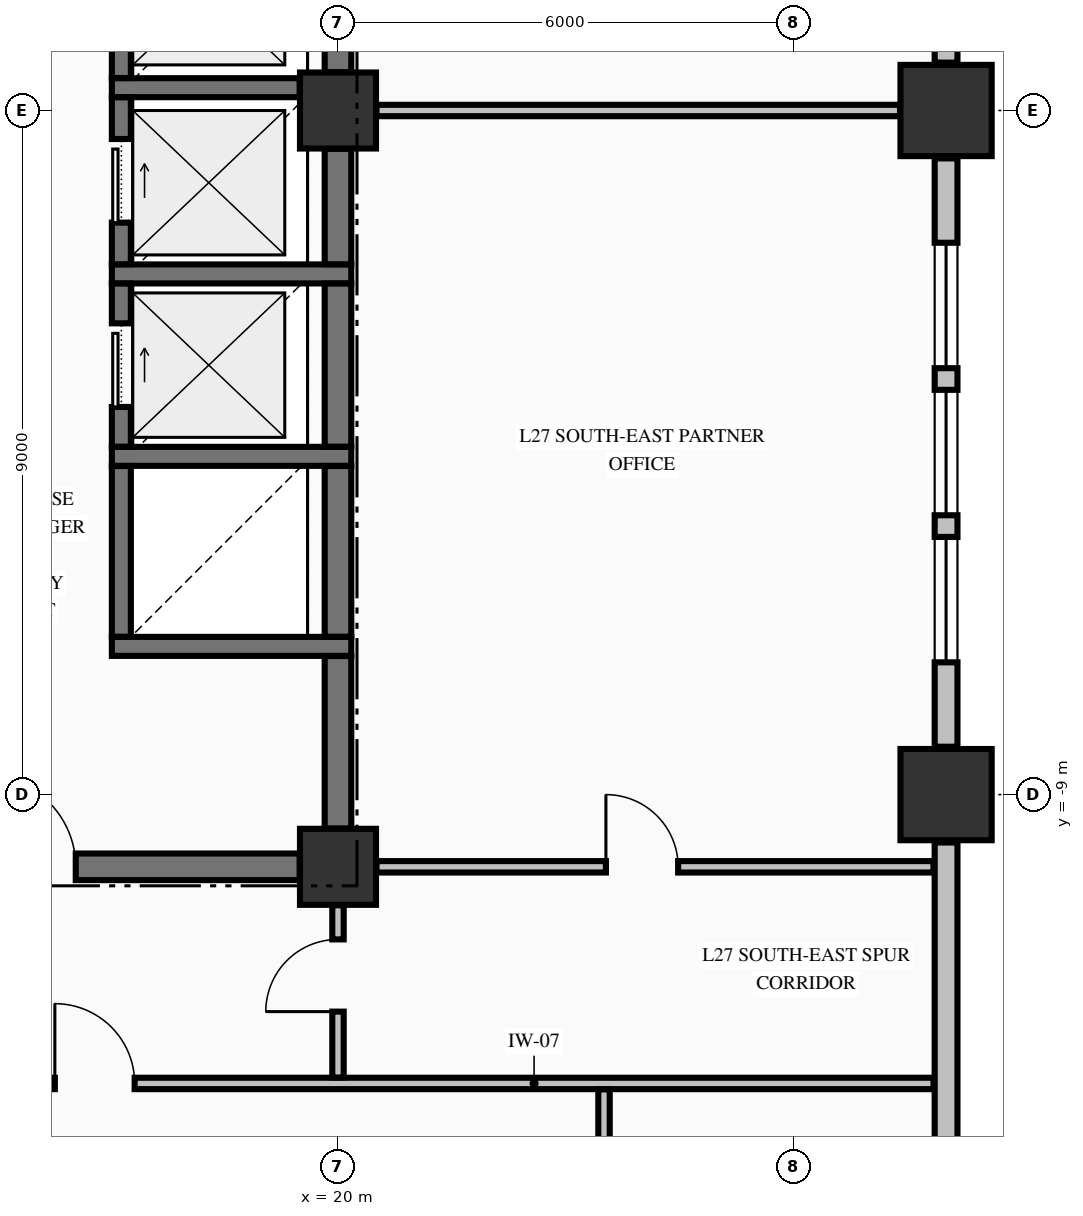
"""IFC4 building model, lengths in metres.
Left out: names, types, materials, properties, quantities, classifications, styles, units other than length and angle.
Written with IfcOpenShell. Run it as: python <this file> out.ifc"""

import sys

from ifc_helpers import new_model, si_unit, direction, frame, frame_2d, origin, origin_2d, place, context, subcontext, project, spatial, rectangle, extrude, element, fill, save


model = new_model("IFC4")
c1 = context("Model", 3, precision=1e-05, world=origin(), true_north=direction((0.0, 1.0)))
c2 = subcontext(c1, "Body", "Model", "MODEL_VIEW")
j1 = project(units=[si_unit("LENGTHUNIT", "METRE"), si_unit("PLANEANGLEUNIT", "RADIAN")], contexts=[c1])
p1 = place(None, origin())
s1 = spatial("IfcSite", under=j1, at=p1, CompositionType="ELEMENT")
p2 = place(p1, origin())
s2 = spatial("IfcBuilding", under=s1, at=p2, CompositionType="ELEMENT")
p3 = place(p2, frame((0.0, 0.0, 109.21)))
s3 = spatial("IfcBuildingStorey", under=s2, at=p3, CompositionType="ELEMENT", Elevation=109.21)
for number, where, z_axis, x_axis in (
    (1, (28.0, -9.0, -0.25), (0.0, 0.0, 1.0), (1.0, 0.0, 0.0)),
    (2, (28.0, 0.0, -0.25), (0.0, 0.0, 1.0), (1.0, 0.0, 0.0)),
):
    element("IfcColumn", number, at=place(p3, frame(where, z_axis=z_axis, x_axis=x_axis)), inside=s3, PredefinedType="COLUMN", context=c2, shape_type="SweptSolid", body=[
        extrude(rectangle(XDim=1.2, YDim=1.2, at=origin_2d()), origin(), (0.0, 0.0, 1.0), 3.57),
    ])
for number, where, z_axis, x_axis in (
    (3, (20.0, -9.95, -0.25), (0.0, 0.0, 1.0), (1.0, 0.0, 0.0)),
    (4, (20.0, 0.0, -0.25), (0.0, 0.0, 1.0), (1.0, 0.0, 0.0)),
):
    element("IfcColumn", number, at=place(p3, frame(where, z_axis=z_axis, x_axis=x_axis)), inside=s3, PredefinedType="COLUMN", context=c2, shape_type="SweptSolid", body=[
        extrude(rectangle(XDim=1.0, YDim=1.0, at=origin_2d()), origin(), (0.0, 0.0, 1.0), 3.57),
    ])
p4 = place(p3, frame((28.0, -20.37, 0.0), z_axis=(0.0, 0.0, 1.0), x_axis=(0.0, 1.0, 0.0)))
e5 = element("IfcWall", 5, at=p4, inside=s3, PredefinedType="STANDARD", context=c2, shape_type="SweptSolid", body=[
    extrude(rectangle(XDim=10.74, YDim=0.3, at=frame_2d((5.37, 0.0))), origin(), (0.0, 0.0, 1.0), 2.712),
])
p5 = place(p3, frame((28.0, -8.37, 0.0), z_axis=(0.0, 0.0, 1.0), x_axis=(0.0, 1.0, 0.0)))
e6 = element("IfcWall", 6, at=p5, inside=s3, PredefinedType="STANDARD", context=c2, shape_type="SweptSolid", body=[
    extrude(rectangle(XDim=7.74, YDim=0.3, at=frame_2d((3.87, 0.0))), origin(), (0.0, 0.0, 1.0), 2.712),
])
p6 = place(p5, frame((1.11, 0.0, 0.8)))
e7 = element("IfcOpeningElement", 7, at=p6, cuts=e6, PredefinedType="OPENING", context=c2, shape_type="SweptSolid", body=[
    extrude(rectangle(XDim=1.65, YDim=1.7, at=frame_2d((0.825, 0.85))), frame((0.0, 0.16, 0.0), z_axis=(0.0, -1.0, 0.0), x_axis=(1.0, 0.0, 0.0)), (0.0, 0.0, 1.0), 0.32),
])
p7 = place(p5, frame((3.045, 0.0, 0.8)))
e8 = element("IfcOpeningElement", 8, at=p7, cuts=e6, PredefinedType="OPENING", context=c2, shape_type="SweptSolid", body=[
    extrude(rectangle(XDim=1.65, YDim=1.7, at=frame_2d((0.825, 0.85))), frame((0.0, 0.16, 0.0), z_axis=(0.0, -1.0, 0.0), x_axis=(1.0, 0.0, 0.0)), (0.0, 0.0, 1.0), 0.32),
])
p8 = place(p5, frame((4.98, 0.0, 0.8)))
e9 = element("IfcOpeningElement", 9, at=p8, cuts=e6, PredefinedType="OPENING", context=c2, shape_type="SweptSolid", body=[
    extrude(rectangle(XDim=1.65, YDim=1.7, at=frame_2d((0.825, 0.85))), frame((0.0, 0.16, 0.0), z_axis=(0.0, -1.0, 0.0), x_axis=(1.0, 0.0, 0.0)), (0.0, 0.0, 1.0), 0.32),
])
p9 = place(p3, frame((28.0, 0.63, 0.0), z_axis=(0.0, 0.0, 1.0), x_axis=(0.0, 1.0, 0.0)))
e10 = element("IfcWall", 10, at=p9, inside=s3, PredefinedType="STANDARD", context=c2, shape_type="SweptSolid", body=[
    extrude(rectangle(XDim=7.74, YDim=0.3, at=frame_2d((3.87, 0.0))), origin(), (0.0, 0.0, 1.0), 2.712),
])
p10 = place(p9, frame((1.11, 0.0, 0.8)))
e11 = element("IfcOpeningElement", 11, at=p10, cuts=e10, PredefinedType="OPENING", context=c2, shape_type="SweptSolid", body=[
    extrude(rectangle(XDim=1.65, YDim=1.7, at=frame_2d((0.825, 0.85))), frame((0.0, 0.16, 0.0), z_axis=(0.0, -1.0, 0.0), x_axis=(1.0, 0.0, 0.0)), (0.0, 0.0, 1.0), 0.32),
])
p11 = place(p9, frame((3.045, 0.0, 0.8)))
e12 = element("IfcOpeningElement", 12, at=p11, cuts=e10, PredefinedType="OPENING", context=c2, shape_type="SweptSolid", body=[
    extrude(rectangle(XDim=1.65, YDim=1.7, at=frame_2d((0.825, 0.85))), frame((0.0, 0.16, 0.0), z_axis=(0.0, -1.0, 0.0), x_axis=(1.0, 0.0, 0.0)), (0.0, 0.0, 1.0), 0.32),
])
p12 = place(p9, frame((4.98, 0.0, 0.8)))
e13 = element("IfcOpeningElement", 13, at=p12, cuts=e10, PredefinedType="OPENING", context=c2, shape_type="SweptSolid", body=[
    extrude(rectangle(XDim=1.65, YDim=1.7, at=frame_2d((0.825, 0.85))), frame((0.0, 0.16, 0.0), z_axis=(0.0, -1.0, 0.0), x_axis=(1.0, 0.0, 0.0)), (0.0, 0.0, 1.0), 0.32),
])
p13 = place(p3, frame((14.7, -9.95, 0.0), z_axis=(0.0, 0.0, 1.0), x_axis=(1.0, 0.0, 0.0)))
e14 = element("IfcWall", 14, at=p13, inside=s3, PredefinedType="SHEAR", context=c2, shape_type="SweptSolid", body=[
    extrude(rectangle(XDim=4.796, YDim=0.35, at=frame_2d((2.398, 0.0))), origin(), (0.0, 0.0, 1.0), 3.32),
])
p14 = place(p13, frame((0.65, 0.0, 0.0)))
e15 = element("IfcOpeningElement", 15, at=p14, cuts=e14, PredefinedType="OPENING", context=c2, shape_type="SweptSolid", body=[
    extrude(rectangle(XDim=1.2, YDim=2.15, at=frame_2d((0.6, 1.075))), frame((0.0, 0.185, 0.0), z_axis=(0.0, -1.0, 0.0), x_axis=(1.0, 0.0, 0.0)), (0.0, 0.0, 1.0), 0.37),
])
for number, where, z_axis, x_axis in (
    (16, (17.025, -7.05, 0.0), (0.0, 0.0, 1.0), (1.0, 0.0, 0.0)),
    (17, (17.025, -4.55, 0.0), (0.0, 0.0, 1.0), (1.0, 0.0, 0.0)),
    (18, (17.025, -2.15, 0.0), (0.0, 0.0, 1.0), (1.0, 0.0, 0.0)),
):
    element("IfcWall", number, at=place(p3, frame(where, z_axis=z_axis, x_axis=x_axis)), inside=s3, PredefinedType="SOLIDWALL", context=c2, shape_type="SweptSolid", body=[
        extrude(rectangle(XDim=3.15, YDim=0.25, at=frame_2d((1.575, 0.0))), origin(), (0.0, 0.0, 1.0), 3.32),
    ])
p15 = place(p3, frame((17.025, 0.3, 0.0), z_axis=(0.0, 0.0, 1.0), x_axis=(1.0, 0.0, 0.0)))
e19 = element("IfcWall", 19, at=p15, inside=s3, PredefinedType="SOLIDWALL", context=c2, shape_type="SweptSolid", body=[
    extrude(rectangle(XDim=2.471, YDim=0.25, at=frame_2d((1.236, 0.0))), origin(), (0.0, 0.0, 1.0), 3.32),
])
p16 = place(p3, frame((-22.835, -12.8, 0.0), z_axis=(0.0, 0.0, 1.0), x_axis=(1.0, 0.0, 0.0)))
e20 = element("IfcWall", 20, at=p16, inside=s3, PredefinedType="PARTITIONING", context=c2, shape_type="SweptSolid", body=[
    extrude(rectangle(XDim=50.67, YDim=0.15, at=frame_2d((25.335, 0.0))), origin(), (0.0, 0.0, 1.0), 3.32),
])
p17 = place(p16, frame((9.46, 0.0, 0.0)))
e21 = element("IfcOpeningElement", 21, at=p17, cuts=e20, PredefinedType="OPENING", context=c2, shape_type="SweptSolid", body=[
    extrude(rectangle(XDim=1.05, YDim=2.15, at=frame_2d((0.525, 1.075))), frame((0.0, 0.085, 0.0), z_axis=(0.0, -1.0, 0.0), x_axis=(1.0, 0.0, 0.0)), (0.0, 0.0, 1.0), 0.17),
])
p18 = place(p16, frame((17.86, 0.0, 0.0)))
e22 = element("IfcOpeningElement", 22, at=p18, cuts=e20, PredefinedType="OPENING", context=c2, shape_type="SweptSolid", body=[
    extrude(rectangle(XDim=0.95, YDim=2.15, at=frame_2d((0.475, 1.075))), frame((0.0, 0.085, 0.0), z_axis=(0.0, -1.0, 0.0), x_axis=(1.0, 0.0, 0.0)), (0.0, 0.0, 1.0), 0.17),
])
p19 = place(p16, frame((22.21, 0.0, 0.0)))
e23 = element("IfcOpeningElement", 23, at=p19, cuts=e20, PredefinedType="OPENING", context=c2, shape_type="SweptSolid", body=[
    extrude(rectangle(XDim=0.95, YDim=2.15, at=frame_2d((0.475, 1.075))), frame((0.0, 0.085, 0.0), z_axis=(0.0, -1.0, 0.0), x_axis=(1.0, 0.0, 0.0)), (0.0, 0.0, 1.0), 0.17),
])
p20 = place(p16, frame((31.51, 0.0, 0.0)))
e24 = element("IfcOpeningElement", 24, at=p20, cuts=e20, PredefinedType="OPENING", context=c2, shape_type="SweptSolid", body=[
    extrude(rectangle(XDim=1.05, YDim=2.15, at=frame_2d((0.525, 1.075))), frame((0.0, 0.085, 0.0), z_axis=(0.0, -1.0, 0.0), x_axis=(1.0, 0.0, 0.0)), (0.0, 0.0, 1.0), 0.17),
])
p21 = place(p16, frame((39.11, 0.0, 0.0)))
e25 = element("IfcOpeningElement", 25, at=p21, cuts=e20, PredefinedType="OPENING", context=c2, shape_type="SweptSolid", body=[
    extrude(rectangle(XDim=1.05, YDim=2.15, at=frame_2d((0.525, 1.075))), frame((0.0, 0.085, 0.0), z_axis=(0.0, -1.0, 0.0), x_axis=(1.0, 0.0, 0.0)), (0.0, 0.0, 1.0), 0.17),
])
p22 = place(p3, frame((20.506, -9.95, 0.0), z_axis=(0.0, 0.0, 1.0), x_axis=(1.0, 0.0, 0.0)))
e26 = element("IfcWall", 26, at=p22, inside=s3, PredefinedType="PARTITIONING", context=c2, shape_type="SweptSolid", body=[
    extrude(rectangle(XDim=7.329, YDim=0.15, at=frame_2d((3.665, 0.0))), origin(), (0.0, 0.0, 1.0), 3.32),
])
p23 = place(p22, frame((3.019, 0.0, 0.0)))
e27 = element("IfcOpeningElement", 27, at=p23, cuts=e26, PredefinedType="OPENING", context=c2, shape_type="SweptSolid", body=[
    extrude(rectangle(XDim=0.95, YDim=2.15, at=frame_2d((0.475, 1.075))), frame((0.0, 0.085, 0.0), z_axis=(0.0, -1.0, 0.0), x_axis=(1.0, 0.0, 0.0)), (0.0, 0.0, 1.0), 0.17),
])
p24 = place(p3, frame((20.506, 0.0, 0.0), z_axis=(0.0, 0.0, 1.0), x_axis=(1.0, 0.0, 0.0)))
e28 = element("IfcWall", 28, at=p24, inside=s3, PredefinedType="PARTITIONING", context=c2, shape_type="SweptSolid", body=[
    extrude(rectangle(XDim=6.888, YDim=0.15, at=frame_2d((3.444, 0.0))), origin(), (0.0, 0.0, 1.0), 2.81),
])
p25 = place(p3, frame((17.15, -6.923, 0.0), z_axis=(0.0, 0.0, 1.0), x_axis=(0.0, 1.0, 0.0)))
e29 = element("IfcWall", 29, at=p25, inside=s3, PredefinedType="SOLIDWALL", context=c2, shape_type="SweptSolid", body=[
    extrude(rectangle(XDim=2.246, YDim=0.25, at=frame_2d((1.123, 0.0))), origin(), (0.0, 0.0, 1.0), 3.32),
])
p26 = place(p3, frame((17.15, -4.423, 0.0), z_axis=(0.0, 0.0, 1.0), x_axis=(0.0, 1.0, 0.0)))
e30 = element("IfcWall", 30, at=p26, inside=s3, PredefinedType="SOLIDWALL", context=c2, shape_type="SweptSolid", body=[
    extrude(rectangle(XDim=2.146, YDim=0.25, at=frame_2d((1.073, 0.0))), origin(), (0.0, 0.0, 1.0), 3.32),
])
p27 = place(p26, frame((0.523, 0.0, 0.0)))
e31 = element("IfcOpeningElement", 31, at=p27, cuts=e30, PredefinedType="OPENING", context=c2, shape_type="SweptSolid", body=[
    extrude(rectangle(XDim=1.1, YDim=2.2, at=frame_2d((0.55, 1.1))), frame((0.0, 0.135, 0.0), z_axis=(0.0, -1.0, 0.0), x_axis=(1.0, 0.0, 0.0)), (0.0, 0.0, 1.0), 0.27),
])
p28 = place(p3, frame((17.15, -2.023, 0.0), z_axis=(0.0, 0.0, 1.0), x_axis=(0.0, 1.0, 0.0)))
e32 = element("IfcWall", 32, at=p28, inside=s3, PredefinedType="SOLIDWALL", context=c2, shape_type="SweptSolid", body=[
    extrude(rectangle(XDim=2.196, YDim=0.25, at=frame_2d((1.098, 0.0))), origin(), (0.0, 0.0, 1.0), 3.32),
])
p29 = place(p28, frame((0.548, 0.0, 0.0)))
e33 = element("IfcOpeningElement", 33, at=p29, cuts=e32, PredefinedType="OPENING", context=c2, shape_type="SweptSolid", body=[
    extrude(rectangle(XDim=1.1, YDim=2.2, at=frame_2d((0.55, 1.1))), frame((0.0, 0.135, 0.0), z_axis=(0.0, -1.0, 0.0), x_axis=(1.0, 0.0, 0.0)), (0.0, 0.0, 1.0), 0.27),
])
p30 = place(p3, frame((17.15, 0.427, 0.0), z_axis=(0.0, 0.0, 1.0), x_axis=(0.0, 1.0, 0.0)))
e34 = element("IfcWall", 34, at=p30, inside=s3, PredefinedType="SOLIDWALL", context=c2, shape_type="SweptSolid", body=[
    extrude(rectangle(XDim=2.196, YDim=0.25, at=frame_2d((1.098, 0.0))), origin(), (0.0, 0.0, 1.0), 3.32),
])
p31 = place(p30, frame((0.548, 0.0, 0.0)))
e35 = element("IfcOpeningElement", 35, at=p31, cuts=e34, PredefinedType="OPENING", context=c2, shape_type="SweptSolid", body=[
    extrude(rectangle(XDim=1.1, YDim=2.2, at=frame_2d((0.55, 1.1))), frame((0.0, 0.135, 0.0), z_axis=(0.0, -1.0, 0.0), x_axis=(1.0, 0.0, 0.0)), (0.0, 0.0, 1.0), 0.27),
])
p32 = place(p3, frame((20.0, -9.446, 0.0), z_axis=(0.0, 0.0, 1.0), x_axis=(0.0, 1.0, 0.0)))
e36 = element("IfcWall", 36, at=p32, inside=s3, PredefinedType="SHEAR", context=c2, shape_type="SweptSolid", body=[
    extrude(rectangle(XDim=2.269, YDim=0.35, at=frame_2d((1.135, 0.0))), origin(), (0.0, 0.0, 1.0), 3.32),
])
p33 = place(p3, frame((20.0, -6.923, 0.0), z_axis=(0.0, 0.0, 1.0), x_axis=(0.0, 1.0, 0.0)))
e37 = element("IfcWall", 37, at=p33, inside=s3, PredefinedType="SHEAR", context=c2, shape_type="SweptSolid", body=[
    extrude(rectangle(XDim=2.246, YDim=0.35, at=frame_2d((1.123, 0.0))), origin(), (0.0, 0.0, 1.0), 3.32),
])
p34 = place(p3, frame((20.0, -4.423, 0.0), z_axis=(0.0, 0.0, 1.0), x_axis=(0.0, 1.0, 0.0)))
e38 = element("IfcWall", 38, at=p34, inside=s3, PredefinedType="SHEAR", context=c2, shape_type="SweptSolid", body=[
    extrude(rectangle(XDim=2.146, YDim=0.35, at=frame_2d((1.073, 0.0))), origin(), (0.0, 0.0, 1.0), 3.32),
])
p35 = place(p3, frame((20.0, -2.023, 0.0), z_axis=(0.0, 0.0, 1.0), x_axis=(0.0, 1.0, 0.0)))
e39 = element("IfcWall", 39, at=p35, inside=s3, PredefinedType="SHEAR", context=c2, shape_type="SweptSolid", body=[
    extrude(rectangle(XDim=1.519, YDim=0.35, at=frame_2d((0.76, 0.0))), origin(), (0.0, 0.0, 1.0), 3.32),
])
p36 = place(p3, frame((20.0, 0.504, 0.0), z_axis=(0.0, 0.0, 1.0), x_axis=(0.0, 1.0, 0.0)))
e40 = element("IfcWall", 40, at=p36, inside=s3, PredefinedType="SHEAR", context=c2, shape_type="SweptSolid", body=[
    extrude(rectangle(XDim=2.119, YDim=0.35, at=frame_2d((1.06, 0.0))), origin(), (0.0, 0.0, 1.0), 3.32),
])
p37 = place(p3, frame((20.0, -12.722, 0.0), z_axis=(0.0, 0.0, 1.0), x_axis=(0.0, 1.0, 0.0)))
e41 = element("IfcWall", 41, at=p37, inside=s3, PredefinedType="PARTITIONING", context=c2, shape_type="SweptSolid", body=[
    extrude(rectangle(XDim=2.266, YDim=0.15, at=frame_2d((1.133, 0.0))), origin(), (0.0, 0.0, 1.0), 2.81),
])
p38 = place(p37, frame((0.867, 0.0, 0.0)))
e42 = element("IfcOpeningElement", 42, at=p38, cuts=e41, PredefinedType="OPENING", context=c2, shape_type="SweptSolid", body=[
    extrude(rectangle(XDim=0.95, YDim=2.15, at=frame_2d((0.475, 1.075))), frame((0.0, 0.085, 0.0), z_axis=(0.0, -1.0, 0.0), x_axis=(1.0, 0.0, 0.0)), (0.0, 0.0, 1.0), 0.17),
])
p39 = place(p3, frame((23.5, -20.394, 0.0), z_axis=(0.0, 0.0, 1.0), x_axis=(0.0, 1.0, 0.0)))
e43 = element("IfcWall", 43, at=p39, inside=s3, PredefinedType="PARTITIONING", context=c2, shape_type="SweptSolid", body=[
    extrude(rectangle(XDim=7.516, YDim=0.15, at=frame_2d((3.758, 0.0))), origin(), (0.0, 0.0, 1.0), 3.32),
])
p40 = place(p6, origin())
e44 = element("IfcWindow", 44, at=p40, inside=s3, PartitioningType="SINGLE_PANEL", PredefinedType="WINDOW", context=c2, shape_type="SweptSolid", body=[
    extrude(rectangle(XDim=1.65, YDim=1.7, at=frame_2d((0.825, 0.85))), frame((0.0, 0.03, 0.0), z_axis=(0.0, -1.0, 0.0), x_axis=(1.0, 0.0, 0.0)), (0.0, 0.0, 1.0), 0.06),
])
fill(e7, e44)
p41 = place(p7, origin())
e45 = element("IfcWindow", 45, at=p41, inside=s3, PartitioningType="SINGLE_PANEL", PredefinedType="WINDOW", context=c2, shape_type="SweptSolid", body=[
    extrude(rectangle(XDim=1.65, YDim=1.7, at=frame_2d((0.825, 0.85))), frame((0.0, 0.03, 0.0), z_axis=(0.0, -1.0, 0.0), x_axis=(1.0, 0.0, 0.0)), (0.0, 0.0, 1.0), 0.06),
])
fill(e8, e45)
p42 = place(p8, origin())
e46 = element("IfcWindow", 46, at=p42, inside=s3, PartitioningType="SINGLE_PANEL", PredefinedType="WINDOW", context=c2, shape_type="SweptSolid", body=[
    extrude(rectangle(XDim=1.65, YDim=1.7, at=frame_2d((0.825, 0.85))), frame((0.0, 0.03, 0.0), z_axis=(0.0, -1.0, 0.0), x_axis=(1.0, 0.0, 0.0)), (0.0, 0.0, 1.0), 0.06),
])
fill(e9, e46)
p43 = place(p27, origin())
e47 = element("IfcDoor", 47, at=p43, inside=s3, OperationType="SLIDING_TO_RIGHT", PredefinedType="DOOR", context=c2, shape_type="SweptSolid", body=[
    extrude(rectangle(XDim=1.1, YDim=2.2, at=frame_2d((0.55, 1.1))), frame((0.0, 0.025, 0.0), z_axis=(0.0, -1.0, 0.0), x_axis=(1.0, 0.0, 0.0)), (0.0, 0.0, 1.0), 0.05),
])
fill(e31, e47)
p44 = place(p29, origin())
e48 = element("IfcDoor", 48, at=p44, inside=s3, OperationType="SLIDING_TO_RIGHT", PredefinedType="DOOR", context=c2, shape_type="SweptSolid", body=[
    extrude(rectangle(XDim=1.1, YDim=2.2, at=frame_2d((0.55, 1.1))), frame((0.0, 0.025, 0.0), z_axis=(0.0, -1.0, 0.0), x_axis=(1.0, 0.0, 0.0)), (0.0, 0.0, 1.0), 0.05),
])
fill(e33, e48)
p45 = place(p14, origin())
e49 = element("IfcDoor", 49, at=p45, inside=s3, OperationType="SINGLE_SWING_LEFT", PredefinedType="DOOR", context=c2, shape_type="SweptSolid", body=[
    extrude(rectangle(XDim=1.2, YDim=2.15, at=frame_2d((0.6, 1.075))), frame((0.0, 0.025, 0.0), z_axis=(0.0, -1.0, 0.0), x_axis=(1.0, 0.0, 0.0)), (0.0, 0.0, 1.0), 0.05),
])
fill(e15, e49)
p46 = place(p21, origin())
e50 = element("IfcDoor", 50, at=p46, inside=s3, OperationType="SINGLE_SWING_LEFT", PredefinedType="DOOR", context=c2, shape_type="SweptSolid", body=[
    extrude(rectangle(XDim=1.05, YDim=2.15, at=frame_2d((0.525, 1.075))), frame((0.0, 0.025, 0.0), z_axis=(0.0, -1.0, 0.0), x_axis=(1.0, 0.0, 0.0)), (0.0, 0.0, 1.0), 0.05),
])
fill(e25, e50)
p47 = place(p38, origin())
e51 = element("IfcDoor", 51, at=p47, inside=s3, OperationType="SINGLE_SWING_LEFT", PredefinedType="DOOR", context=c2, shape_type="SweptSolid", body=[
    extrude(rectangle(XDim=0.95, YDim=2.15, at=frame_2d((0.475, 1.075))), frame((0.0, 0.025, 0.0), z_axis=(0.0, -1.0, 0.0), x_axis=(1.0, 0.0, 0.0)), (0.0, 0.0, 1.0), 0.05),
])
fill(e42, e51)
p48 = place(p23, origin())
e52 = element("IfcDoor", 52, at=p48, inside=s3, OperationType="SINGLE_SWING_LEFT", PredefinedType="DOOR", context=c2, shape_type="SweptSolid", body=[
    extrude(rectangle(XDim=0.95, YDim=2.15, at=frame_2d((0.475, 1.075))), frame((0.0, 0.025, 0.0), z_axis=(0.0, -1.0, 0.0), x_axis=(1.0, 0.0, 0.0)), (0.0, 0.0, 1.0), 0.05),
])
fill(e27, e52)
save(model, sys.argv[1])
